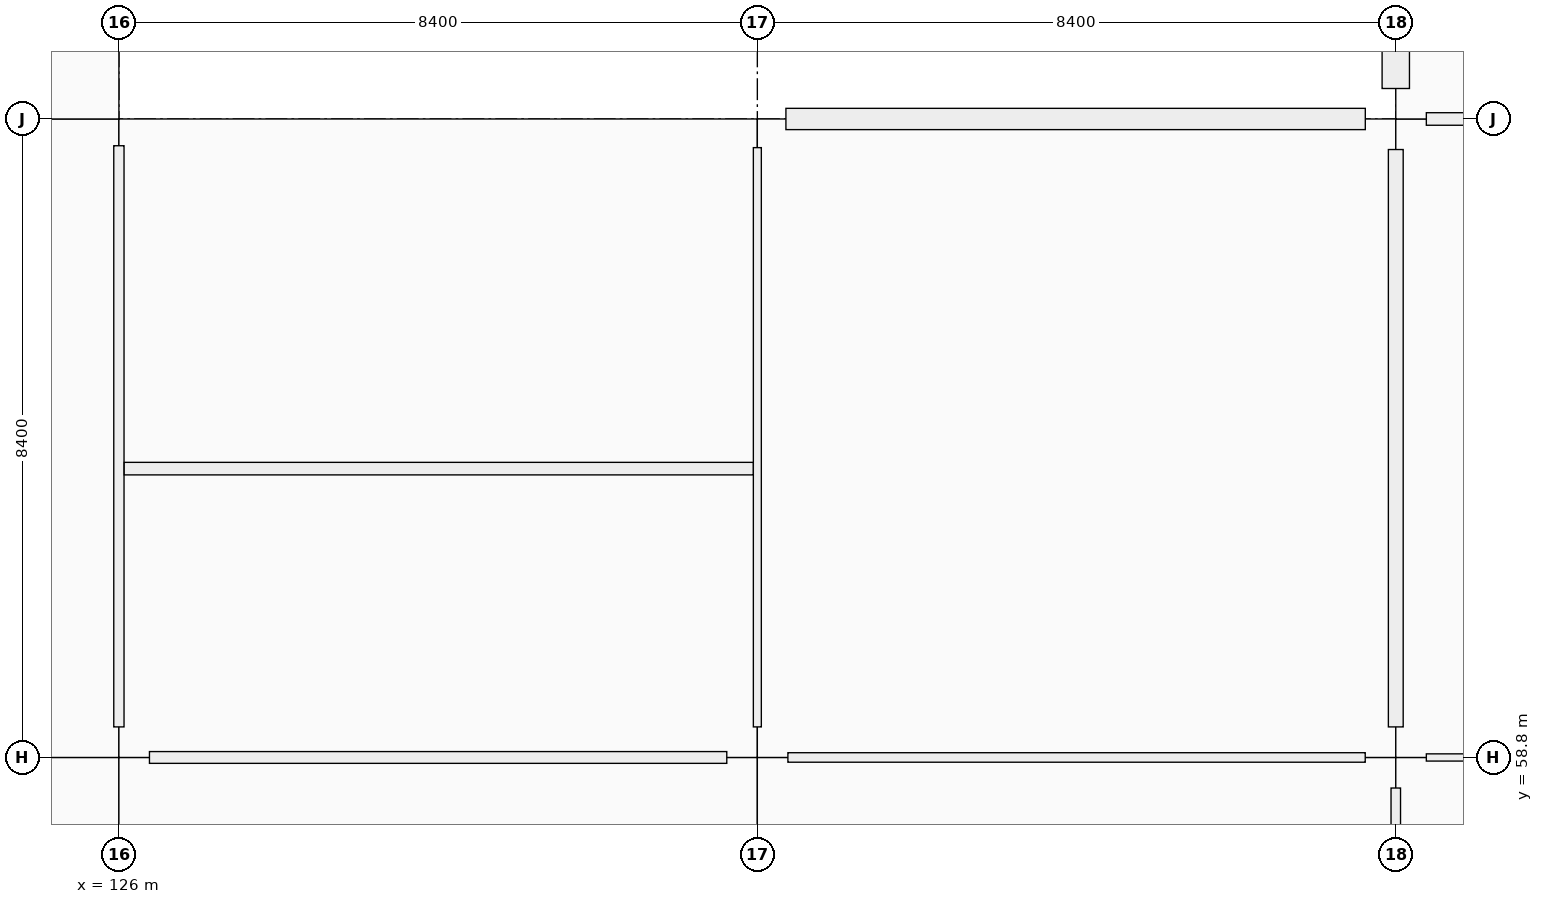
"""IFC4 building model, lengths in metres.
Left out: names, types, materials, properties, quantities, classifications, styles, units other than length and angle.
Written with IfcOpenShell. Run it as: python <this file> out.ifc"""

import sys

from ifc_helpers import new_model, si_unit, direction, frame, frame_2d, origin, origin_2d, place, context, subcontext, project, spatial, rectangle, extrude, element, fill, save


model = new_model("IFC4")
c1 = context("Model", 3, precision=1e-05, world=origin(), true_north=direction((0.0, 1.0)))
c2 = subcontext(c1, "Body", "Model", "MODEL_VIEW")
j1 = project(units=[si_unit("LENGTHUNIT", "METRE"), si_unit("PLANEANGLEUNIT", "RADIAN")], contexts=[c1])
p1 = place(None, origin())
s1 = spatial("IfcSite", under=j1, at=p1, CompositionType="ELEMENT")
p2 = place(p1, origin())
s2 = spatial("IfcBuilding", under=s1, at=p2, CompositionType="ELEMENT")
p3 = place(p2, origin())
s3 = spatial("IfcBuildingStorey", under=s2, at=p3, CompositionType="ELEMENT", Elevation=0.0)
p4 = place(p3, frame((126.0, 58.8, 0.0), z_axis=(0.0, 0.0, 1.0), x_axis=(1.0, 0.0, 0.0)))
e1 = element("IfcColumn", 1, at=p4, inside=s3, PredefinedType="COLUMN", context=c2, shape_type="SweptSolid", body=[
    extrude(rectangle(XDim=0.8, YDim=0.8, at=origin_2d()), origin(), (0.0, 0.0, 1.0), 5.76),
])
p5 = place(p3, frame((126.0, 67.2, 0.0), z_axis=(0.0, 0.0, 1.0), x_axis=(1.0, 0.0, 0.0)))
e2 = element("IfcColumn", 2, at=p5, inside=s3, PredefinedType="COLUMN", context=c2, shape_type="SweptSolid", body=[
    extrude(rectangle(XDim=0.7, YDim=0.7, at=origin_2d()), origin(), (0.0, 0.0, 1.0), 5.76),
])
p6 = place(p3, frame((134.4, 58.8, 0.0), z_axis=(0.0, 0.0, 1.0), x_axis=(1.0, 0.0, 0.0)))
e3 = element("IfcColumn", 3, at=p6, inside=s3, PredefinedType="COLUMN", context=c2, shape_type="SweptSolid", body=[
    extrude(rectangle(XDim=0.8, YDim=0.8, at=origin_2d()), origin(), (0.0, 0.0, 1.0), 5.76),
])
p7 = place(p3, frame((134.4, 67.2, 0.0), z_axis=(0.0, 0.0, 1.0), x_axis=(1.0, 0.0, 0.0)))
e4 = element("IfcColumn", 4, at=p7, inside=s3, PredefinedType="COLUMN", context=c2, shape_type="SweptSolid", body=[
    extrude(rectangle(XDim=0.75, YDim=0.75, at=origin_2d()), origin(), (0.0, 0.0, 1.0), 5.76),
])
for number, where, z_axis, x_axis in (
    (5, (142.8, 58.8, 0.0), (0.0, 0.0, 1.0), (1.0, 0.0, 0.0)),
    (6, (142.8, 67.2, 0.0), (0.0, 0.0, 1.0), (1.0, 0.0, 0.0)),
):
    element("IfcColumn", number, at=place(p3, frame(where, z_axis=z_axis, x_axis=x_axis)), inside=s3, PredefinedType="COLUMN", context=c2, shape_type="SweptSolid", body=[
        extrude(rectangle(XDim=0.8, YDim=0.8, at=origin_2d()), origin(), (0.0, 0.0, 1.0), 5.76),
    ])
p8 = place(p3, frame((134.776, 67.2, 0.0), z_axis=(0.0, 0.0, 1.0), x_axis=(1.0, 0.0, 0.0)))
e7 = element("IfcWall", 7, at=p8, inside=s3, PredefinedType="SOLIDWALL", context=c2, shape_type="SweptSolid", body=[
    extrude(rectangle(XDim=7.623, YDim=0.28, at=frame_2d((3.812, 0.0))), origin(), (0.0, 0.0, 1.0), 4.7),
])
p9 = place(p8, frame((2.537, 0.0, 0.9)))
e8 = element("IfcOpeningElement", 8, at=p9, cuts=e7, PredefinedType="OPENING", context=c2, shape_type="SweptSolid", body=[
    extrude(rectangle(XDim=2.55, YDim=1.95, at=frame_2d((1.275, 0.975))), frame((0.0, 0.14, 0.0), z_axis=(0.0, -1.0, 0.0), x_axis=(1.0, 0.0, 0.0)), (0.0, 0.0, 1.0), 0.28),
])
p10 = place(p3, frame((142.8, 67.601, 0.0), z_axis=(0.0, 0.0, 1.0), x_axis=(0.0, 1.0, 0.0)))
e9 = element("IfcWall", 9, at=p10, inside=s3, PredefinedType="SOLIDWALL", context=c2, shape_type="SweptSolid", body=[
    extrude(rectangle(XDim=7.673, YDim=0.36, at=frame_2d((3.836, 0.0))), origin(), (0.0, 0.0, 1.0), 4.7),
])
p11 = place(p10, frame((2.937, 0.0, 0.9)))
e10 = element("IfcOpeningElement", 10, at=p11, cuts=e9, PredefinedType="OPENING", context=c2, shape_type="SweptSolid", body=[
    extrude(rectangle(XDim=1.8, YDim=1.8, at=frame_2d((0.9, 0.9))), frame((0.0, 0.18, 0.0), z_axis=(0.0, -1.0, 0.0), x_axis=(1.0, 0.0, 0.0)), (0.0, 0.0, 1.0), 0.36),
])
p12 = place(p3, frame((126.402, 58.8, 0.0), z_axis=(0.0, 0.0, 1.0), x_axis=(1.0, 0.0, 0.0)))
e11 = element("IfcWall", 11, at=p12, inside=s3, PredefinedType="PARTITIONING", context=c2, shape_type="SweptSolid", body=[
    extrude(rectangle(XDim=7.596, YDim=0.155, at=frame_2d((3.798, 0.0))), origin(), (0.0, 0.0, 1.0), 3.66),
])
p13 = place(p3, frame((134.802, 58.8, 0.0), z_axis=(0.0, 0.0, 1.0), x_axis=(1.0, 0.0, 0.0)))
e12 = element("IfcWall", 12, at=p13, inside=s3, PredefinedType="PARTITIONING", context=c2, shape_type="SweptSolid", body=[
    extrude(rectangle(XDim=7.596, YDim=0.125, at=frame_2d((3.798, 0.0))), origin(), (0.0, 0.0, 1.0), 3.66),
])
p14 = place(p13, frame((3.293, 0.0, 0.0)))
e13 = element("IfcOpeningElement", 13, at=p14, cuts=e12, PredefinedType="OPENING", context=c2, shape_type="SweptSolid", body=[
    extrude(rectangle(XDim=1.01, YDim=2.12, at=frame_2d((0.505, 1.06))), frame((0.0, 0.062, 0.0), z_axis=(0.0, -1.0, 0.0), x_axis=(1.0, 0.0, 0.0)), (0.0, 0.0, 1.0), 0.125),
])
p15 = place(p3, frame((143.202, 58.8, 0.0), z_axis=(0.0, 0.0, 1.0), x_axis=(1.0, 0.0, 0.0)))
e14 = element("IfcWall", 14, at=p15, inside=s3, PredefinedType="PARTITIONING", context=c2, shape_type="SweptSolid", body=[
    extrude(rectangle(XDim=7.596, YDim=0.095, at=frame_2d((3.798, 0.0))), origin(), (0.0, 0.0, 1.0), 3.66),
])
p16 = place(p3, frame((143.202, 67.2, 0.0), z_axis=(0.0, 0.0, 1.0), x_axis=(1.0, 0.0, 0.0)))
e15 = element("IfcWall", 15, at=p16, inside=s3, PredefinedType="PARTITIONING", context=c2, shape_type="SweptSolid", body=[
    extrude(rectangle(XDim=7.596, YDim=0.165, at=frame_2d((3.798, 0.0))), origin(), (0.0, 0.0, 1.0), 3.66),
])
p17 = place(p16, frame((3.278, 0.0, 0.0)))
e16 = element("IfcOpeningElement", 16, at=p17, cuts=e15, PredefinedType="OPENING", context=c2, shape_type="SweptSolid", body=[
    extrude(rectangle(XDim=1.04, YDim=2.2, at=frame_2d((0.52, 1.1))), frame((0.0, 0.083, 0.0), z_axis=(0.0, -1.0, 0.0), x_axis=(1.0, 0.0, 0.0)), (0.0, 0.0, 1.0), 0.165),
])
p18 = place(p3, frame((126.0, 59.202, 0.0), z_axis=(0.0, 0.0, 1.0), x_axis=(0.0, 1.0, 0.0)))
e17 = element("IfcWall", 17, at=p18, inside=s3, PredefinedType="PARTITIONING", context=c2, shape_type="SweptSolid", body=[
    extrude(rectangle(XDim=7.646, YDim=0.135, at=frame_2d((3.823, 0.0))), origin(), (0.0, 0.0, 1.0), 3.66),
])
p19 = place(p18, frame((1.153, 0.0, 0.0)))
e18 = element("IfcOpeningElement", 18, at=p19, cuts=e17, PredefinedType="OPENING", context=c2, shape_type="SweptSolid", body=[
    extrude(rectangle(XDim=0.97, YDim=2.12, at=frame_2d((0.485, 1.06))), frame((0.0, 0.067, 0.0), z_axis=(0.0, -1.0, 0.0), x_axis=(1.0, 0.0, 0.0)), (0.0, 0.0, 1.0), 0.135),
])
p20 = place(p18, frame((5.093, 0.0, 0.0)))
e19 = element("IfcOpeningElement", 19, at=p20, cuts=e17, PredefinedType="OPENING", context=c2, shape_type="SweptSolid", body=[
    extrude(rectangle(XDim=0.93, YDim=2.12, at=frame_2d((0.465, 1.06))), frame((0.0, 0.067, 0.0), z_axis=(0.0, -1.0, 0.0), x_axis=(1.0, 0.0, 0.0)), (0.0, 0.0, 1.0), 0.135),
])
p21 = place(p3, frame((134.4, 59.202, 0.0), z_axis=(0.0, 0.0, 1.0), x_axis=(0.0, 1.0, 0.0)))
e20 = element("IfcWall", 20, at=p21, inside=s3, PredefinedType="PARTITIONING", context=c2, shape_type="SweptSolid", body=[
    extrude(rectangle(XDim=7.621, YDim=0.105, at=frame_2d((3.811, 0.0))), origin(), (0.0, 0.0, 1.0), 3.66),
])
p22 = place(p3, frame((142.8, 50.802, 0.0), z_axis=(0.0, 0.0, 1.0), x_axis=(0.0, 1.0, 0.0)))
e21 = element("IfcWall", 21, at=p22, inside=s3, PredefinedType="PARTITIONING", context=c2, shape_type="SweptSolid", body=[
    extrude(rectangle(XDim=7.596, YDim=0.125, at=frame_2d((3.798, 0.0))), origin(), (0.0, 0.0, 1.0), 3.66),
])
p23 = place(p22, frame((0.593, 0.0, 0.0)))
e22 = element("IfcOpeningElement", 22, at=p23, cuts=e21, PredefinedType="OPENING", context=c2, shape_type="SweptSolid", body=[
    extrude(rectangle(XDim=0.94, YDim=2.08, at=frame_2d((0.47, 1.04))), frame((0.0, 0.062, 0.0), z_axis=(0.0, -1.0, 0.0), x_axis=(1.0, 0.0, 0.0)), (0.0, 0.0, 1.0), 0.125),
])
p24 = place(p22, frame((4.503, 0.0, 0.0)))
e23 = element("IfcOpeningElement", 23, at=p24, cuts=e21, PredefinedType="OPENING", context=c2, shape_type="SweptSolid", body=[
    extrude(rectangle(XDim=0.96, YDim=2.1, at=frame_2d((0.48, 1.05))), frame((0.0, 0.062, 0.0), z_axis=(0.0, -1.0, 0.0), x_axis=(1.0, 0.0, 0.0)), (0.0, 0.0, 1.0), 0.125),
])
p25 = place(p3, frame((142.8, 59.202, 0.0), z_axis=(0.0, 0.0, 1.0), x_axis=(0.0, 1.0, 0.0)))
e24 = element("IfcWall", 24, at=p25, inside=s3, PredefinedType="PARTITIONING", context=c2, shape_type="SweptSolid", body=[
    extrude(rectangle(XDim=7.596, YDim=0.195, at=frame_2d((3.798, 0.0))), origin(), (0.0, 0.0, 1.0), 3.66),
])
p26 = place(p25, frame((3.268, 0.0, 0.0)))
e25 = element("IfcOpeningElement", 25, at=p26, cuts=e24, PredefinedType="OPENING", context=c2, shape_type="SweptSolid", body=[
    extrude(rectangle(XDim=1.06, YDim=2.25, at=frame_2d((0.53, 1.125))), frame((0.0, 0.098, 0.0), z_axis=(0.0, -1.0, 0.0), x_axis=(1.0, 0.0, 0.0)), (0.0, 0.0, 1.0), 0.195),
])
p27 = place(p3, frame((126.07, 62.6, 0.0), z_axis=(0.0, 0.0, 1.0), x_axis=(1.0, 0.0, 0.0)))
e26 = element("IfcWall", 26, at=p27, inside=s3, PredefinedType="PARTITIONING", context=c2, shape_type="SweptSolid", body=[
    extrude(rectangle(XDim=8.276, YDim=0.165, at=frame_2d((4.138, 0.0))), origin(), (0.0, 0.0, 1.0), 3.66),
])
p28 = place(p9, origin())
e27 = element("IfcWindow", 27, at=p28, inside=s3, PartitioningType="SINGLE_PANEL", PredefinedType="WINDOW", context=c2, shape_type="SweptSolid", body=[
    extrude(rectangle(XDim=2.55, YDim=1.95, at=frame_2d((1.275, 0.975))), frame((0.0, 0.03, 0.0), z_axis=(0.0, -1.0, 0.0), x_axis=(1.0, 0.0, 0.0)), (0.0, 0.0, 1.0), 0.06),
])
fill(e8, e27)
p29 = place(p19, origin())
e28 = element("IfcDoor", 28, at=p29, inside=s3, OperationType="SINGLE_SWING_LEFT", PredefinedType="DOOR", context=c2, shape_type="SweptSolid", body=[
    extrude(rectangle(XDim=0.97, YDim=2.12, at=frame_2d((0.485, 1.06))), frame((0.0, 0.025, 0.0), z_axis=(0.0, -1.0, 0.0), x_axis=(1.0, 0.0, 0.0)), (0.0, 0.0, 1.0), 0.05),
])
fill(e18, e28)
p30 = place(p20, origin())
e29 = element("IfcDoor", 29, at=p30, inside=s3, OperationType="SINGLE_SWING_RIGHT", PredefinedType="DOOR", context=c2, shape_type="SweptSolid", body=[
    extrude(rectangle(XDim=0.93, YDim=2.12, at=frame_2d((0.465, 1.06))), frame((0.0, 0.025, 0.0), z_axis=(0.0, -1.0, 0.0), x_axis=(1.0, 0.0, 0.0)), (0.0, 0.0, 1.0), 0.05),
])
fill(e19, e29)
p31 = place(p14, origin())
e30 = element("IfcDoor", 30, at=p31, inside=s3, OperationType="SINGLE_SWING_LEFT", PredefinedType="DOOR", context=c2, shape_type="SweptSolid", body=[
    extrude(rectangle(XDim=1.01, YDim=2.12, at=frame_2d((0.505, 1.06))), frame((0.0, 0.025, 0.0), z_axis=(0.0, -1.0, 0.0), x_axis=(1.0, 0.0, 0.0)), (0.0, 0.0, 1.0), 0.05),
])
fill(e13, e30)
p32 = place(p26, origin())
e31 = element("IfcDoor", 31, at=p32, inside=s3, OperationType="SINGLE_SWING_LEFT", PredefinedType="DOOR", context=c2, shape_type="SweptSolid", body=[
    extrude(rectangle(XDim=1.06, YDim=2.25, at=frame_2d((0.53, 1.125))), frame((0.0, 0.025, 0.0), z_axis=(0.0, -1.0, 0.0), x_axis=(1.0, 0.0, 0.0)), (0.0, 0.0, 1.0), 0.05),
])
fill(e25, e31)
save(model, sys.argv[1])
